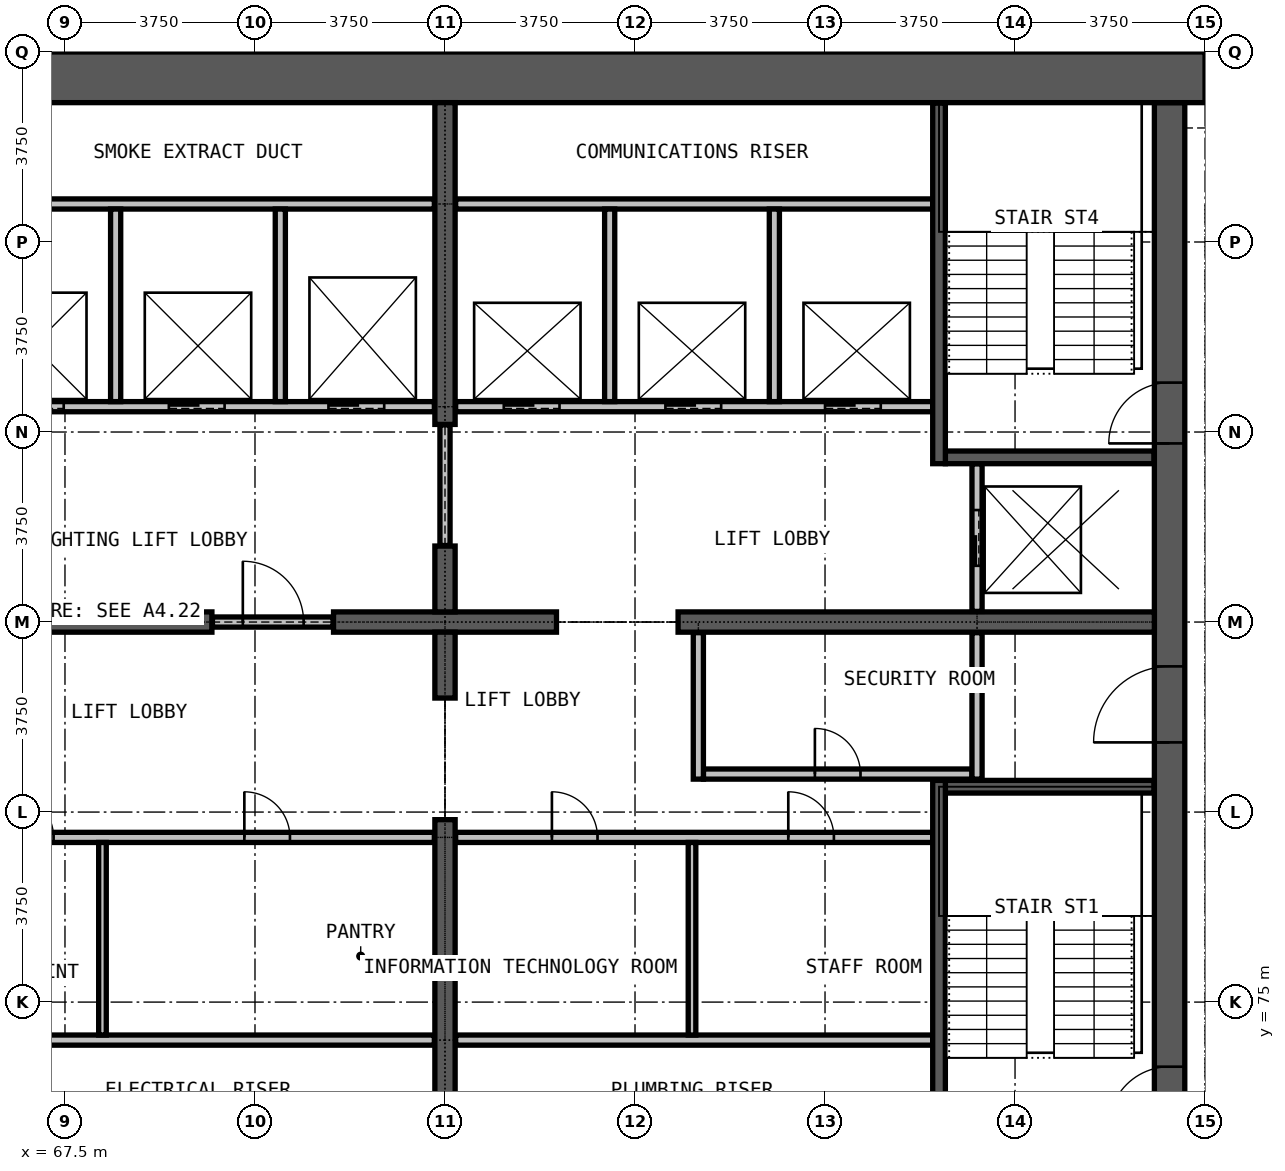
"""IFC4 building model, lengths in metres.
Left out: names, types, materials, properties, quantities, classifications, styles, units other than length and angle.
Written with IfcOpenShell. Run it as: python <this file> out.ifc"""

import sys

from ifc_helpers import new_model, si_unit, direction, frame, frame_2d, origin, place, context, subcontext, project, spatial, rectangle, extrude, element, fill, save


model = new_model("IFC4")
c1 = context("Model", 3, precision=1e-05, world=origin(), true_north=direction((0.0, 1.0)))
c2 = subcontext(c1, "Body", "Model", "MODEL_VIEW")
j1 = project(units=[si_unit("LENGTHUNIT", "METRE"), si_unit("PLANEANGLEUNIT", "RADIAN")], contexts=[c1])
p1 = place(None, origin())
s1 = spatial("IfcSite", under=j1, at=p1, CompositionType="ELEMENT")
p2 = place(p1, origin())
s2 = spatial("IfcBuilding", under=s1, at=p2, CompositionType="ELEMENT")
p3 = place(p2, frame((0.0, 0.0, 228.3)))
s3 = spatial("IfcBuildingStorey", under=s2, at=p3, CompositionType="ELEMENT", Elevation=228.3)
p4 = place(p3, frame((89.3, 72.25, 0.0), z_axis=(0.0, 0.0, 1.0), x_axis=(0.0, 1.0, 0.0)))
e1 = element("IfcWall", 1, at=p4, inside=s3, PredefinedType="SHEAR", context=c2, shape_type="SweptSolid", body=[
    extrude(rectangle(XDim=20.5, YDim=0.6, at=frame_2d((10.25, 0.0))), origin(), (0.0, 0.0, 1.0), 3.6),
])
p5 = place(p4, frame((0.275, 0.0, 0.0)))
e2 = element("IfcOpeningElement", 2, at=p5, cuts=e1, PredefinedType="OPENING", context=c2, shape_type="SweptSolid", body=[
    extrude(rectangle(XDim=1.2, YDim=2.2, at=frame_2d((0.6, 1.1))), frame((0.0, 0.31, 0.0), z_axis=(0.0, -1.0, 0.0), x_axis=(1.0, 0.0, 0.0)), (0.0, 0.0, 1.0), 0.62),
])
p6 = place(p4, frame((13.775, 0.0, 0.0)))
e3 = element("IfcOpeningElement", 3, at=p6, cuts=e1, PredefinedType="OPENING", context=c2, shape_type="SweptSolid", body=[
    extrude(rectangle(XDim=1.2, YDim=2.2, at=frame_2d((0.6, 1.1))), frame((0.0, 0.31, 0.0), z_axis=(0.0, -1.0, 0.0), x_axis=(1.0, 0.0, 0.0)), (0.0, 0.0, 1.0), 0.62),
])
p7 = place(p4, frame((7.875, 0.0, 0.0)))
e4 = element("IfcOpeningElement", 4, at=p7, cuts=e1, PredefinedType="OPENING", context=c2, shape_type="SweptSolid", body=[
    extrude(rectangle(XDim=1.5, YDim=2.2, at=frame_2d((0.75, 1.1))), frame((0.0, 0.31, 0.0), z_axis=(0.0, -1.0, 0.0), x_axis=(1.0, 0.0, 0.0)), (0.0, 0.0, 1.0), 0.62),
])
p8 = place(p3, frame((90.0, 93.25, 0.0), z_axis=(0.0, 0.0, 1.0), x_axis=(-1.0, 0.0, 0.0)))
e5 = element("IfcWall", 5, at=p8, inside=s3, PredefinedType="SHEAR", context=c2, shape_type="SweptSolid", body=[
    extrude(rectangle(XDim=30.0, YDim=1.0, at=frame_2d((15.0, 0.0))), origin(), (0.0, 0.0, 1.0), 3.6),
])
p9 = place(p3, frame((61.0, 82.5, 0.0), z_axis=(0.0, 0.0, 1.0), x_axis=(1.0, 0.0, 0.0)))
e6 = element("IfcWall", 6, at=p9, inside=s3, PredefinedType="SHEAR", context=c2, shape_type="SweptSolid", body=[
    extrude(rectangle(XDim=9.4, YDim=0.4, at=frame_2d((4.7, 0.0))), origin(), (0.0, 0.0, 1.0), 3.6),
])
p10 = place(p3, frame((72.8, 82.5, 0.0), z_axis=(0.0, 0.0, 1.0), x_axis=(1.0, 0.0, 0.0)))
e7 = element("IfcWall", 7, at=p10, inside=s3, PredefinedType="SHEAR", context=c2, shape_type="SweptSolid", body=[
    extrude(rectangle(XDim=4.4, YDim=0.4, at=frame_2d((2.2, 0.0))), origin(), (0.0, 0.0, 1.0), 3.6),
])
p11 = place(p3, frame((79.6, 82.5, 0.0), z_axis=(0.0, 0.0, 1.0), x_axis=(1.0, 0.0, 0.0)))
e8 = element("IfcWall", 8, at=p11, inside=s3, PredefinedType="SHEAR", context=c2, shape_type="SweptSolid", body=[
    extrude(rectangle(XDim=9.4, YDim=0.4, at=frame_2d((4.7, 0.0))), origin(), (0.0, 0.0, 1.0), 3.6),
])
p12 = place(p3, frame((75.0, 72.25, 0.0), z_axis=(0.0, 0.0, 1.0), x_axis=(0.0, 1.0, 0.0)))
e9 = element("IfcWall", 9, at=p12, inside=s3, PredefinedType="SHEAR", context=c2, shape_type="SweptSolid", body=[
    extrude(rectangle(XDim=6.35, YDim=0.4, at=frame_2d((3.175, 0.0))), origin(), (0.0, 0.0, 1.0), 3.6),
])
for number, where, z_axis, x_axis in (
    (10, (75.0, 81.0, 0.0), (0.0, 0.0, 1.0), (0.0, 1.0, 0.0)),
    (11, (75.0, 82.7, 0.0), (0.0, 0.0, 1.0), (0.0, 1.0, 0.0)),
):
    element("IfcWall", number, at=place(p3, frame(where, z_axis=z_axis, x_axis=x_axis)), inside=s3, PredefinedType="SHEAR", context=c2, shape_type="SweptSolid", body=[
        extrude(rectangle(XDim=1.3, YDim=0.4, at=frame_2d((0.65, 0.0))), origin(), (0.0, 0.0, 1.0), 3.6),
    ])
p13 = place(p3, frame((75.0, 86.4, 0.0), z_axis=(0.0, 0.0, 1.0), x_axis=(0.0, 1.0, 0.0)))
e12 = element("IfcWall", 12, at=p13, inside=s3, PredefinedType="SHEAR", context=c2, shape_type="SweptSolid", body=[
    extrude(rectangle(XDim=6.35, YDim=0.4, at=frame_2d((3.175, 0.0))), origin(), (0.0, 0.0, 1.0), 3.6),
])
for number, where, z_axis, x_axis in (
    (13, (65.375, 74.25, 0.0), (0.0, 0.0, 1.0), (1.0, 0.0, 0.0)),
    (14, (75.21, 74.25, 0.0), (0.0, 0.0, 1.0), (1.0, 0.0, 0.0)),
):
    element("IfcWall", number, at=place(p3, frame(where, z_axis=z_axis, x_axis=x_axis)), inside=s3, PredefinedType="PARTITIONING", context=c2, shape_type="SweptSolid", body=[
        extrude(rectangle(XDim=9.415, YDim=0.2, at=frame_2d((4.708, 0.0))), origin(), (0.0, 0.0, 1.0), 3.3),
    ])
p14 = place(p3, frame((65.375, 78.25, 0.0), z_axis=(0.0, 0.0, 1.0), x_axis=(1.0, 0.0, 0.0)))
e15 = element("IfcWall", 15, at=p14, inside=s3, PredefinedType="PARTITIONING", context=c2, shape_type="SweptSolid", body=[
    extrude(rectangle(XDim=9.415, YDim=0.2, at=frame_2d((4.708, 0.0))), origin(), (0.0, 0.0, 1.0), 3.3),
])
p15 = place(p14, frame((1.0, 0.0, 0.0)))
e16 = element("IfcOpeningElement", 16, at=p15, cuts=e15, PredefinedType="OPENING", context=c2, shape_type="SweptSolid", body=[
    extrude(rectangle(XDim=0.9, YDim=2.2, at=frame_2d((0.45, 1.1))), frame((0.0, 0.11, 0.0), z_axis=(0.0, -1.0, 0.0), x_axis=(1.0, 0.0, 0.0)), (0.0, 0.0, 1.0), 0.22),
])
p16 = place(p14, frame((5.665, 0.0, 0.0)))
e17 = element("IfcOpeningElement", 17, at=p16, cuts=e15, PredefinedType="OPENING", context=c2, shape_type="SweptSolid", body=[
    extrude(rectangle(XDim=0.9, YDim=2.2, at=frame_2d((0.45, 1.1))), frame((0.0, 0.11, 0.0), z_axis=(0.0, -1.0, 0.0), x_axis=(1.0, 0.0, 0.0)), (0.0, 0.0, 1.0), 0.22),
])
p17 = place(p3, frame((75.21, 78.25, 0.0), z_axis=(0.0, 0.0, 1.0), x_axis=(1.0, 0.0, 0.0)))
e18 = element("IfcWall", 18, at=p17, inside=s3, PredefinedType="PARTITIONING", context=c2, shape_type="SweptSolid", body=[
    extrude(rectangle(XDim=9.415, YDim=0.2, at=frame_2d((4.708, 0.0))), origin(), (0.0, 0.0, 1.0), 3.3),
])
p18 = place(p17, frame((1.9, 0.0, 0.0)))
e19 = element("IfcOpeningElement", 19, at=p18, cuts=e18, PredefinedType="OPENING", context=c2, shape_type="SweptSolid", body=[
    extrude(rectangle(XDim=0.9, YDim=2.2, at=frame_2d((0.45, 1.1))), frame((0.0, 0.11, 0.0), z_axis=(0.0, -1.0, 0.0), x_axis=(1.0, 0.0, 0.0)), (0.0, 0.0, 1.0), 0.22),
])
p19 = place(p17, frame((6.565, 0.0, 0.0)))
e20 = element("IfcOpeningElement", 20, at=p19, cuts=e18, PredefinedType="OPENING", context=c2, shape_type="SweptSolid", body=[
    extrude(rectangle(XDim=0.9, YDim=2.2, at=frame_2d((0.45, 1.1))), frame((0.0, 0.11, 0.0), z_axis=(0.0, -1.0, 0.0), x_axis=(1.0, 0.0, 0.0)), (0.0, 0.0, 1.0), 0.22),
])
p20 = place(p3, frame((80.1, 79.5, 0.0), z_axis=(0.0, 0.0, 1.0), x_axis=(1.0, 0.0, 0.0)))
e21 = element("IfcWall", 21, at=p20, inside=s3, PredefinedType="PARTITIONING", context=c2, shape_type="SweptSolid", body=[
    extrude(rectangle(XDim=5.3, YDim=0.2, at=frame_2d((2.65, 0.0))), origin(), (0.0, 0.0, 1.0), 3.3),
])
p21 = place(p20, frame((2.2, 0.0, 0.0)))
e22 = element("IfcOpeningElement", 22, at=p21, cuts=e21, PredefinedType="OPENING", context=c2, shape_type="SweptSolid", body=[
    extrude(rectangle(XDim=0.9, YDim=2.2, at=frame_2d((0.45, 1.1))), frame((0.0, 0.11, 0.0), z_axis=(0.0, -1.0, 0.0), x_axis=(1.0, 0.0, 0.0)), (0.0, 0.0, 1.0), 0.22),
])
p22 = place(p3, frame((70.41, 82.5, 0.0), z_axis=(0.0, 0.0, 1.0), x_axis=(1.0, 0.0, 0.0)))
e23 = element("IfcWall", 23, at=p22, inside=s3, PredefinedType="PARTITIONING", context=c2, shape_type="SweptSolid", body=[
    extrude(rectangle(XDim=2.38, YDim=0.2, at=frame_2d((1.19, 0.0))), origin(), (0.0, 0.0, 1.0), 2.4),
])
p23 = place(p22, frame((0.6, 0.0, 0.0)))
e24 = element("IfcOpeningElement", 24, at=p23, cuts=e23, PredefinedType="OPENING", context=c2, shape_type="SweptSolid", body=[
    extrude(rectangle(XDim=1.2, YDim=2.2, at=frame_2d((0.6, 1.1))), frame((0.0, 0.11, 0.0), z_axis=(0.0, -1.0, 0.0), x_axis=(1.0, 0.0, 0.0)), (0.0, 0.0, 1.0), 0.22),
])
p24 = place(p3, frame((75.0, 84.01, 0.0), z_axis=(0.0, 0.0, 1.0), x_axis=(0.0, 1.0, 0.0)))
e25 = element("IfcWall", 25, at=p24, inside=s3, PredefinedType="PARTITIONING", context=c2, shape_type="SweptSolid", body=[
    extrude(rectangle(XDim=2.38, YDim=0.2, at=frame_2d((1.19, 0.0))), origin(), (0.0, 0.0, 1.0), 2.4),
])
for number, where, z_axis, x_axis in (
    (26, (80.0, 79.4, 0.0), (0.0, 0.0, 1.0), (0.0, 1.0, 0.0)),
    (27, (85.5, 79.4, 0.0), (0.0, 0.0, 1.0), (0.0, 1.0, 0.0)),
):
    element("IfcWall", number, at=place(p3, frame(where, z_axis=z_axis, x_axis=x_axis)), inside=s3, PredefinedType="PARTITIONING", context=c2, shape_type="SweptSolid", body=[
        extrude(rectangle(XDim=2.89, YDim=0.2, at=frame_2d((1.445, 0.0))), origin(), (0.0, 0.0, 1.0), 3.3),
    ])
for number, where, z_axis, x_axis in (
    (28, (68.24, 74.35, 0.0), (0.0, 0.0, 1.0), (0.0, 1.0, 0.0)),
    (29, (79.875, 74.35, 0.0), (0.0, 0.0, 1.0), (0.0, 1.0, 0.0)),
):
    element("IfcWall", number, at=place(p3, frame(where, z_axis=z_axis, x_axis=x_axis)), inside=s3, PredefinedType="PARTITIONING", context=c2, shape_type="SweptSolid", body=[
        extrude(rectangle(XDim=3.8, YDim=0.15, at=frame_2d((1.9, 0.0))), origin(), (0.0, 0.0, 1.0), 3.3),
    ])
p25 = place(p3, frame((65.375, 86.75, 0.0), z_axis=(0.0, 0.0, 1.0), x_axis=(1.0, 0.0, 0.0)))
e30 = element("IfcWall", 30, at=p25, inside=s3, PredefinedType="PARTITIONING", context=c2, shape_type="SweptSolid", body=[
    extrude(rectangle(XDim=9.415, YDim=0.2, at=frame_2d((4.708, 0.0))), origin(), (0.0, 0.0, 1.0), 3.3),
])
p26 = place(p25, frame((1.0, 0.0, 0.0)))
e31 = element("IfcOpeningElement", 31, at=p26, cuts=e30, PredefinedType="OPENING", context=c2, shape_type="SweptSolid", body=[
    extrude(rectangle(XDim=1.1, YDim=2.2, at=frame_2d((0.55, 1.1))), frame((0.0, 0.11, 0.0), z_axis=(0.0, -1.0, 0.0), x_axis=(1.0, 0.0, 0.0)), (0.0, 0.0, 1.0), 0.22),
])
p27 = place(p25, frame((4.175, 0.0, 0.0)))
e32 = element("IfcOpeningElement", 32, at=p27, cuts=e30, PredefinedType="OPENING", context=c2, shape_type="SweptSolid", body=[
    extrude(rectangle(XDim=1.1, YDim=2.2, at=frame_2d((0.55, 1.1))), frame((0.0, 0.11, 0.0), z_axis=(0.0, -1.0, 0.0), x_axis=(1.0, 0.0, 0.0)), (0.0, 0.0, 1.0), 0.22),
])
p28 = place(p25, frame((7.325, 0.0, 0.0)))
e33 = element("IfcOpeningElement", 33, at=p28, cuts=e30, PredefinedType="OPENING", context=c2, shape_type="SweptSolid", body=[
    extrude(rectangle(XDim=1.1, YDim=2.2, at=frame_2d((0.55, 1.1))), frame((0.0, 0.11, 0.0), z_axis=(0.0, -1.0, 0.0), x_axis=(1.0, 0.0, 0.0)), (0.0, 0.0, 1.0), 0.22),
])
p29 = place(p3, frame((75.21, 86.75, 0.0), z_axis=(0.0, 0.0, 1.0), x_axis=(1.0, 0.0, 0.0)))
e34 = element("IfcWall", 34, at=p29, inside=s3, PredefinedType="PARTITIONING", context=c2, shape_type="SweptSolid", body=[
    extrude(rectangle(XDim=9.415, YDim=0.2, at=frame_2d((4.708, 0.0))), origin(), (0.0, 0.0, 1.0), 3.3),
])
p30 = place(p29, frame((0.95, 0.0, 0.0)))
e35 = element("IfcOpeningElement", 35, at=p30, cuts=e34, PredefinedType="OPENING", context=c2, shape_type="SweptSolid", body=[
    extrude(rectangle(XDim=1.1, YDim=2.2, at=frame_2d((0.55, 1.1))), frame((0.0, 0.11, 0.0), z_axis=(0.0, -1.0, 0.0), x_axis=(1.0, 0.0, 0.0)), (0.0, 0.0, 1.0), 0.22),
])
p31 = place(p29, frame((4.14, 0.0, 0.0)))
e36 = element("IfcOpeningElement", 36, at=p31, cuts=e34, PredefinedType="OPENING", context=c2, shape_type="SweptSolid", body=[
    extrude(rectangle(XDim=1.1, YDim=2.2, at=frame_2d((0.55, 1.1))), frame((0.0, 0.11, 0.0), z_axis=(0.0, -1.0, 0.0), x_axis=(1.0, 0.0, 0.0)), (0.0, 0.0, 1.0), 0.22),
])
p32 = place(p29, frame((7.29, 0.0, 0.0)))
e37 = element("IfcOpeningElement", 37, at=p32, cuts=e34, PredefinedType="OPENING", context=c2, shape_type="SweptSolid", body=[
    extrude(rectangle(XDim=1.1, YDim=2.2, at=frame_2d((0.55, 1.1))), frame((0.0, 0.11, 0.0), z_axis=(0.0, -1.0, 0.0), x_axis=(1.0, 0.0, 0.0)), (0.0, 0.0, 1.0), 0.22),
])
for number, where, z_axis, x_axis in (
    (38, (65.375, 90.75, 0.0), (0.0, 0.0, 1.0), (1.0, 0.0, 0.0)),
    (39, (75.21, 90.75, 0.0), (0.0, 0.0, 1.0), (1.0, 0.0, 0.0)),
):
    element("IfcWall", number, at=place(p3, frame(where, z_axis=z_axis, x_axis=x_axis)), inside=s3, PredefinedType="PARTITIONING", context=c2, shape_type="SweptSolid", body=[
        extrude(rectangle(XDim=9.415, YDim=0.2, at=frame_2d((4.708, 0.0))), origin(), (0.0, 0.0, 1.0), 3.3),
    ])
for number, where, z_axis, x_axis in (
    (40, (68.5, 86.85, 0.0), (0.0, 0.0, 1.0), (0.0, 1.0, 0.0)),
    (41, (71.75, 86.85, 0.0), (0.0, 0.0, 1.0), (0.0, 1.0, 0.0)),
    (42, (78.25, 86.85, 0.0), (0.0, 0.0, 1.0), (0.0, 1.0, 0.0)),
    (43, (81.5, 86.85, 0.0), (0.0, 0.0, 1.0), (0.0, 1.0, 0.0)),
):
    element("IfcWall", number, at=place(p3, frame(where, z_axis=z_axis, x_axis=x_axis)), inside=s3, PredefinedType="PARTITIONING", context=c2, shape_type="SweptSolid", body=[
        extrude(rectangle(XDim=3.8, YDim=0.2, at=frame_2d((1.9, 0.0))), origin(), (0.0, 0.0, 1.0), 3.3),
    ])
p33 = place(p3, frame((85.5, 82.71, 0.0), z_axis=(0.0, 0.0, 1.0), x_axis=(0.0, 1.0, 0.0)))
e44 = element("IfcWall", 44, at=p33, inside=s3, PredefinedType="PARTITIONING", context=c2, shape_type="SweptSolid", body=[
    extrude(rectangle(XDim=2.915, YDim=0.2, at=frame_2d((1.458, 0.0))), origin(), (0.0, 0.0, 1.0), 3.3),
])
p34 = place(p33, frame((0.9, 0.0, 0.0)))
e45 = element("IfcOpeningElement", 45, at=p34, cuts=e44, PredefinedType="OPENING", context=c2, shape_type="SweptSolid", body=[
    extrude(rectangle(XDim=1.1, YDim=2.2, at=frame_2d((0.55, 1.1))), frame((0.0, 0.11, 0.0), z_axis=(0.0, -1.0, 0.0), x_axis=(1.0, 0.0, 0.0)), (0.0, 0.0, 1.0), 0.22),
])
for number, where, z_axis, x_axis in (
    (46, (84.875, 79.25, 0.0), (0.0, 0.0, 1.0), (1.0, 0.0, 0.0)),
    (47, (84.875, 85.75, 0.0), (0.0, 0.0, 1.0), (1.0, 0.0, 0.0)),
):
    element("IfcWall", number, at=place(p3, frame(where, z_axis=z_axis, x_axis=x_axis)), inside=s3, PredefinedType="PARTITIONING", context=c2, shape_type="SweptSolid", body=[
        extrude(rectangle(XDim=4.115, YDim=0.25, at=frame_2d((2.058, 0.0))), origin(), (0.0, 0.0, 1.0), 3.3),
    ])
for number, where, z_axis, x_axis in (
    (48, (84.75, 72.26, 0.0), (0.0, 0.0, 1.0), (0.0, 1.0, 0.0)),
    (49, (84.75, 85.625, 0.0), (0.0, 0.0, 1.0), (0.0, 1.0, 0.0)),
):
    element("IfcWall", number, at=place(p3, frame(where, z_axis=z_axis, x_axis=x_axis)), inside=s3, PredefinedType="PARTITIONING", context=c2, shape_type="SweptSolid", body=[
        extrude(rectangle(XDim=7.115, YDim=0.25, at=frame_2d((3.558, 0.0))), origin(), (0.0, 0.0, 1.0), 3.3),
    ])
p35 = place(p30, origin())
e50 = element("IfcDoor", 50, at=p35, inside=s3, OperationType="DOUBLE_DOOR_SLIDING", PredefinedType="DOOR", context=c2, shape_type="SweptSolid", body=[
    extrude(rectangle(XDim=1.1, YDim=2.2, at=frame_2d((0.55, 1.1))), frame((0.0, 0.025, 0.0), z_axis=(0.0, -1.0, 0.0), x_axis=(1.0, 0.0, 0.0)), (0.0, 0.0, 1.0), 0.05),
])
fill(e35, e50)
p36 = place(p31, origin())
e51 = element("IfcDoor", 51, at=p36, inside=s3, OperationType="DOUBLE_DOOR_SLIDING", PredefinedType="DOOR", context=c2, shape_type="SweptSolid", body=[
    extrude(rectangle(XDim=1.1, YDim=2.2, at=frame_2d((0.55, 1.1))), frame((0.0, 0.025, 0.0), z_axis=(0.0, -1.0, 0.0), x_axis=(1.0, 0.0, 0.0)), (0.0, 0.0, 1.0), 0.05),
])
fill(e36, e51)
p37 = place(p32, origin())
e52 = element("IfcDoor", 52, at=p37, inside=s3, OperationType="DOUBLE_DOOR_SLIDING", PredefinedType="DOOR", context=c2, shape_type="SweptSolid", body=[
    extrude(rectangle(XDim=1.1, YDim=2.2, at=frame_2d((0.55, 1.1))), frame((0.0, 0.025, 0.0), z_axis=(0.0, -1.0, 0.0), x_axis=(1.0, 0.0, 0.0)), (0.0, 0.0, 1.0), 0.05),
])
fill(e37, e52)
p38 = place(p26, origin())
e53 = element("IfcDoor", 53, at=p38, inside=s3, OperationType="DOUBLE_DOOR_SLIDING", PredefinedType="DOOR", context=c2, shape_type="SweptSolid", body=[
    extrude(rectangle(XDim=1.1, YDim=2.2, at=frame_2d((0.55, 1.1))), frame((0.0, 0.025, 0.0), z_axis=(0.0, -1.0, 0.0), x_axis=(1.0, 0.0, 0.0)), (0.0, 0.0, 1.0), 0.05),
])
fill(e31, e53)
p39 = place(p27, origin())
e54 = element("IfcDoor", 54, at=p39, inside=s3, OperationType="DOUBLE_DOOR_SLIDING", PredefinedType="DOOR", context=c2, shape_type="SweptSolid", body=[
    extrude(rectangle(XDim=1.1, YDim=2.2, at=frame_2d((0.55, 1.1))), frame((0.0, 0.025, 0.0), z_axis=(0.0, -1.0, 0.0), x_axis=(1.0, 0.0, 0.0)), (0.0, 0.0, 1.0), 0.05),
])
fill(e32, e54)
p40 = place(p28, origin())
e55 = element("IfcDoor", 55, at=p40, inside=s3, OperationType="DOUBLE_DOOR_SLIDING", PredefinedType="DOOR", context=c2, shape_type="SweptSolid", body=[
    extrude(rectangle(XDim=1.1, YDim=2.2, at=frame_2d((0.55, 1.1))), frame((0.0, 0.025, 0.0), z_axis=(0.0, -1.0, 0.0), x_axis=(1.0, 0.0, 0.0)), (0.0, 0.0, 1.0), 0.05),
])
fill(e33, e55)
p41 = place(p34, origin())
e56 = element("IfcDoor", 56, at=p41, inside=s3, OperationType="DOUBLE_DOOR_SLIDING", PredefinedType="DOOR", context=c2, shape_type="SweptSolid", body=[
    extrude(rectangle(XDim=1.1, YDim=2.2, at=frame_2d((0.55, 1.1))), frame((0.0, 0.025, 0.0), z_axis=(0.0, -1.0, 0.0), x_axis=(1.0, 0.0, 0.0)), (0.0, 0.0, 1.0), 0.05),
])
fill(e45, e56)
p42 = place(p23, origin())
e57 = element("IfcDoor", 57, at=p42, inside=s3, OperationType="SINGLE_SWING_RIGHT", PredefinedType="DOOR", context=c2, shape_type="SweptSolid", body=[
    extrude(rectangle(XDim=1.2, YDim=2.2, at=frame_2d((0.6, 1.1))), frame((0.0, 0.025, 0.0), z_axis=(0.0, -1.0, 0.0), x_axis=(1.0, 0.0, 0.0)), (0.0, 0.0, 1.0), 0.05),
])
fill(e24, e57)
p43 = place(p5, origin())
e58 = element("IfcDoor", 58, at=p43, inside=s3, OperationType="SINGLE_SWING_LEFT", PredefinedType="DOOR", context=c2, shape_type="SweptSolid", body=[
    extrude(rectangle(XDim=1.2, YDim=2.2, at=frame_2d((0.6, 1.1))), frame((0.0, 0.025, 0.0), z_axis=(0.0, -1.0, 0.0), x_axis=(1.0, 0.0, 0.0)), (0.0, 0.0, 1.0), 0.05),
])
fill(e2, e58)
p44 = place(p6, origin())
e59 = element("IfcDoor", 59, at=p44, inside=s3, OperationType="SINGLE_SWING_LEFT", PredefinedType="DOOR", context=c2, shape_type="SweptSolid", body=[
    extrude(rectangle(XDim=1.2, YDim=2.2, at=frame_2d((0.6, 1.1))), frame((0.0, 0.025, 0.0), z_axis=(0.0, -1.0, 0.0), x_axis=(1.0, 0.0, 0.0)), (0.0, 0.0, 1.0), 0.05),
])
fill(e3, e59)
p45 = place(p7, origin())
e60 = element("IfcDoor", 60, at=p45, inside=s3, OperationType="DOUBLE_DOOR_SINGLE_SWING", PredefinedType="DOOR", context=c2, shape_type="SweptSolid", body=[
    extrude(rectangle(XDim=1.5, YDim=2.2, at=frame_2d((0.75, 1.1))), frame((0.0, 0.025, 0.0), z_axis=(0.0, -1.0, 0.0), x_axis=(1.0, 0.0, 0.0)), (0.0, 0.0, 1.0), 0.05),
])
fill(e4, e60)
p46 = place(p21, origin())
e61 = element("IfcDoor", 61, at=p46, inside=s3, OperationType="SINGLE_SWING_LEFT", PredefinedType="DOOR", context=c2, shape_type="SweptSolid", body=[
    extrude(rectangle(XDim=0.9, YDim=2.2, at=frame_2d((0.45, 1.1))), frame((0.0, 0.025, 0.0), z_axis=(0.0, -1.0, 0.0), x_axis=(1.0, 0.0, 0.0)), (0.0, 0.0, 1.0), 0.05),
])
fill(e22, e61)
p47 = place(p15, origin())
e62 = element("IfcDoor", 62, at=p47, inside=s3, OperationType="SINGLE_SWING_LEFT", PredefinedType="DOOR", context=c2, shape_type="SweptSolid", body=[
    extrude(rectangle(XDim=0.9, YDim=2.2, at=frame_2d((0.45, 1.1))), frame((0.0, 0.025, 0.0), z_axis=(0.0, -1.0, 0.0), x_axis=(1.0, 0.0, 0.0)), (0.0, 0.0, 1.0), 0.05),
])
fill(e16, e62)
p48 = place(p16, origin())
e63 = element("IfcDoor", 63, at=p48, inside=s3, OperationType="SINGLE_SWING_LEFT", PredefinedType="DOOR", context=c2, shape_type="SweptSolid", body=[
    extrude(rectangle(XDim=0.9, YDim=2.2, at=frame_2d((0.45, 1.1))), frame((0.0, 0.025, 0.0), z_axis=(0.0, -1.0, 0.0), x_axis=(1.0, 0.0, 0.0)), (0.0, 0.0, 1.0), 0.05),
])
fill(e17, e63)
p49 = place(p18, origin())
e64 = element("IfcDoor", 64, at=p49, inside=s3, OperationType="SINGLE_SWING_LEFT", PredefinedType="DOOR", context=c2, shape_type="SweptSolid", body=[
    extrude(rectangle(XDim=0.9, YDim=2.2, at=frame_2d((0.45, 1.1))), frame((0.0, 0.025, 0.0), z_axis=(0.0, -1.0, 0.0), x_axis=(1.0, 0.0, 0.0)), (0.0, 0.0, 1.0), 0.05),
])
fill(e19, e64)
p50 = place(p19, origin())
e65 = element("IfcDoor", 65, at=p50, inside=s3, OperationType="SINGLE_SWING_LEFT", PredefinedType="DOOR", context=c2, shape_type="SweptSolid", body=[
    extrude(rectangle(XDim=0.9, YDim=2.2, at=frame_2d((0.45, 1.1))), frame((0.0, 0.025, 0.0), z_axis=(0.0, -1.0, 0.0), x_axis=(1.0, 0.0, 0.0)), (0.0, 0.0, 1.0), 0.05),
])
fill(e20, e65)
save(model, sys.argv[1])
